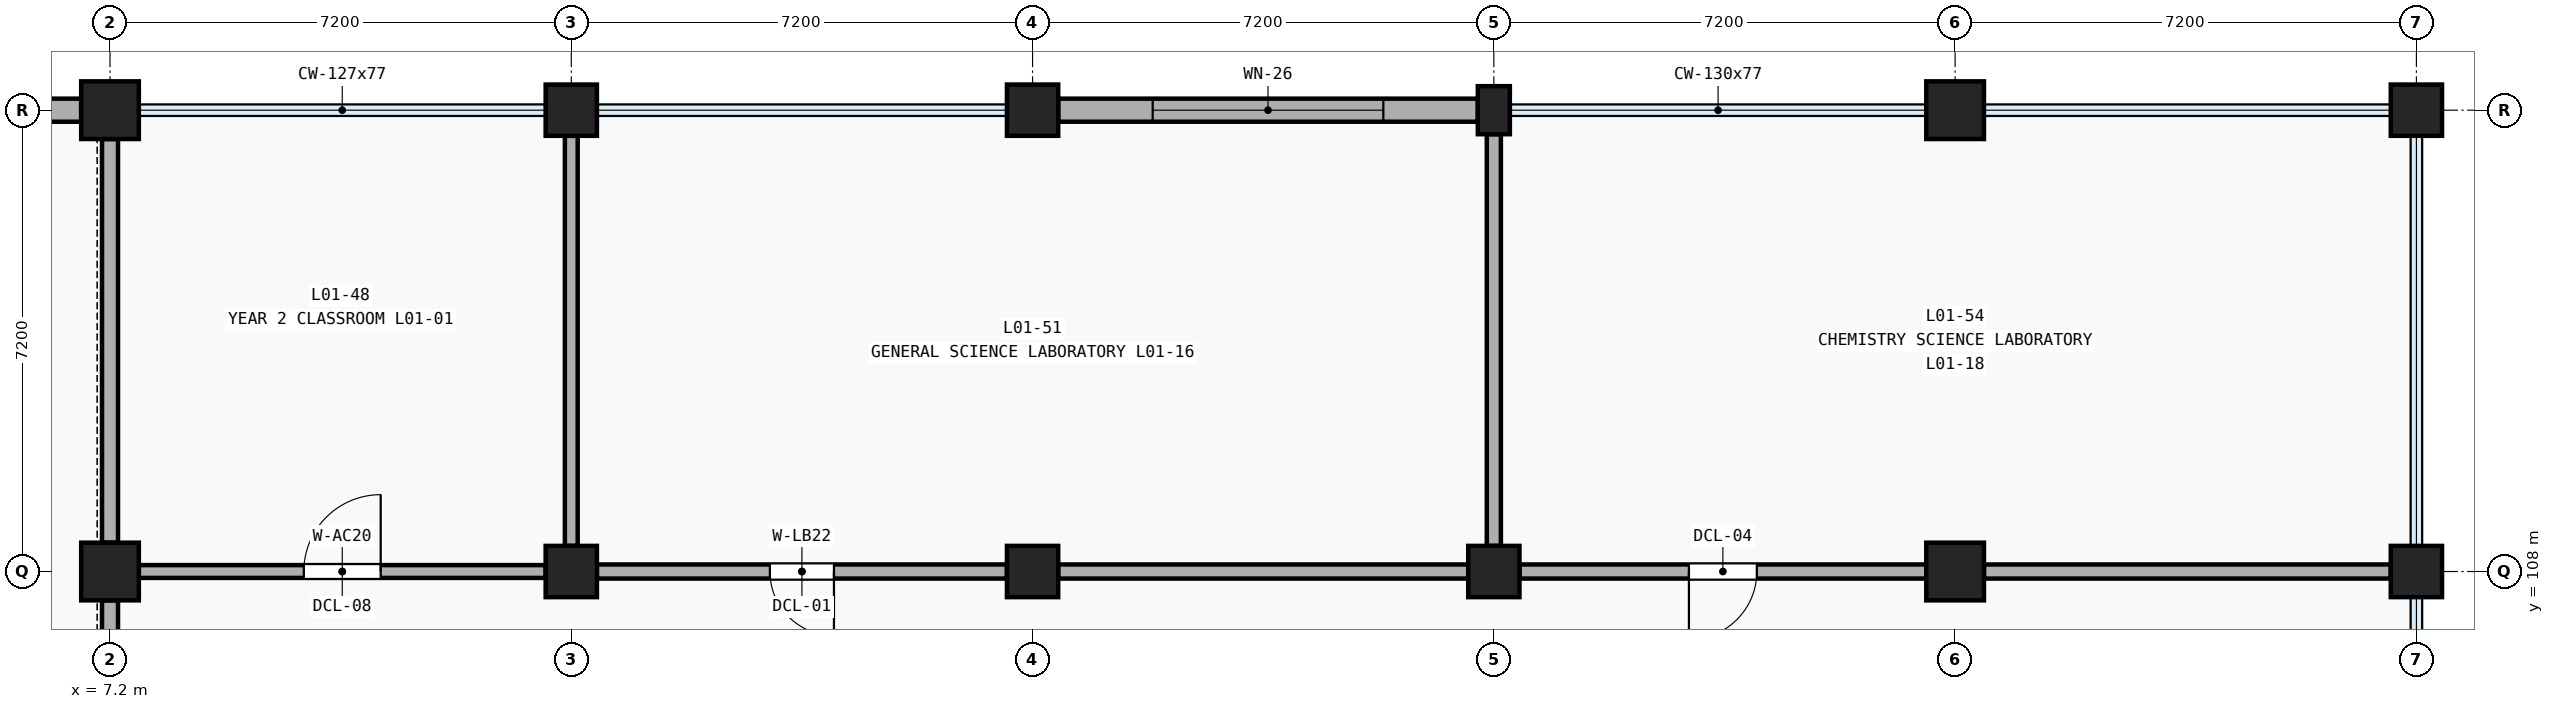
"""IFC4 building model, lengths in metres.
Left out: names, types, materials, properties, quantities, classifications, styles, units other than length and angle.
Written with IfcOpenShell. Run it as: python <this file> out.ifc"""

import sys

from ifc_helpers import new_model, si_unit, direction, frame, frame_2d, origin, origin_2d, place, context, subcontext, project, spatial, rectangle, extrude, element, fill, save


model = new_model("IFC4")
c1 = context("Model", 3, precision=1e-05, world=origin(), true_north=direction((0.0, 1.0)))
c2 = subcontext(c1, "Body", "Model", "MODEL_VIEW")
j1 = project(units=[si_unit("LENGTHUNIT", "METRE"), si_unit("PLANEANGLEUNIT", "RADIAN")], contexts=[c1])
p1 = place(None, origin())
s1 = spatial("IfcSite", under=j1, at=p1, CompositionType="ELEMENT")
p2 = place(p1, origin())
s2 = spatial("IfcBuilding", under=s1, at=p2, CompositionType="ELEMENT")
p3 = place(p2, frame((0.0, 0.0, 4.8)))
s3 = spatial("IfcBuildingStorey", under=s2, at=p3, CompositionType="ELEMENT", Elevation=4.8)
for number, where, z_axis, x_axis in (
    (1, (7.2, 108.0, 0.0), (0.0, 0.0, 1.0), (1.0, 0.0, 0.0)),
    (2, (7.2, 115.2, 0.0), (0.0, 0.0, 1.0), (1.0, 0.0, 0.0)),
):
    element("IfcColumn", number, at=place(p3, frame(where, z_axis=z_axis, x_axis=x_axis)), inside=s3, PredefinedType="COLUMN", context=c2, shape_type="SweptSolid", body=[
        extrude(rectangle(XDim=0.9, YDim=0.9, at=origin_2d()), origin(), (0.0, 0.0, 1.0), 4.8),
    ])
for number, where, z_axis, x_axis in (
    (3, (14.4, 108.0, 0.0), (0.0, 0.0, 1.0), (1.0, 0.0, 0.0)),
    (4, (14.4, 115.2, 0.0), (0.0, 0.0, 1.0), (1.0, 0.0, 0.0)),
    (5, (21.6, 108.0, 0.0), (0.0, 0.0, 1.0), (1.0, 0.0, 0.0)),
    (6, (21.6, 115.2, 0.0), (0.0, 0.0, 1.0), (1.0, 0.0, 0.0)),
    (7, (28.8, 108.0, 0.0), (0.0, 0.0, 1.0), (1.0, 0.0, 0.0)),
):
    element("IfcColumn", number, at=place(p3, frame(where, z_axis=z_axis, x_axis=x_axis)), inside=s3, PredefinedType="COLUMN", context=c2, shape_type="SweptSolid", body=[
        extrude(rectangle(XDim=0.8, YDim=0.8, at=origin_2d()), origin(), (0.0, 0.0, 1.0), 4.8),
    ])
p4 = place(p3, frame((28.8, 115.2, 0.0), z_axis=(0.0, 0.0, 1.0), x_axis=(1.0, 0.0, 0.0)))
e8 = element("IfcColumn", 8, at=p4, inside=s3, PredefinedType="PILASTER", context=c2, shape_type="SweptSolid", body=[
    extrude(rectangle(XDim=0.5, YDim=0.75, at=origin_2d()), origin(), (0.0, 0.0, 1.0), 4.8),
])
for number, where, z_axis, x_axis in (
    (9, (36.0, 108.0, 0.0), (0.0, 0.0, 1.0), (1.0, 0.0, 0.0)),
    (10, (36.0, 115.2, 0.0), (0.0, 0.0, 1.0), (1.0, 0.0, 0.0)),
):
    element("IfcColumn", number, at=place(p3, frame(where, z_axis=z_axis, x_axis=x_axis)), inside=s3, PredefinedType="COLUMN", context=c2, shape_type="SweptSolid", body=[
        extrude(rectangle(XDim=0.9, YDim=0.9, at=origin_2d()), origin(), (0.0, 0.0, 1.0), 4.8),
    ])
for number, where, z_axis, x_axis in (
    (11, (43.2, 108.0, 0.0), (0.0, 0.0, 1.0), (1.0, 0.0, 0.0)),
    (12, (43.2, 115.2, 0.0), (0.0, 0.0, 1.0), (1.0, 0.0, 0.0)),
):
    element("IfcColumn", number, at=place(p3, frame(where, z_axis=z_axis, x_axis=x_axis)), inside=s3, PredefinedType="COLUMN", context=c2, shape_type="SweptSolid", body=[
        extrude(rectangle(XDim=0.8, YDim=0.8, at=origin_2d()), origin(), (0.0, 0.0, 1.0), 4.8),
    ])
p5 = place(p3, frame((0.4, 115.2, 0.0), z_axis=(0.0, 0.0, 1.0), x_axis=(1.0, 0.0, 0.0)))
e13 = element("IfcWall", 13, at=p5, inside=s3, PredefinedType="SOLIDWALL", context=c2, shape_type="SweptSolid", body=[
    extrude(rectangle(XDim=6.35, YDim=0.36, at=frame_2d((3.175, 0.0))), origin(), (0.0, 0.0, 1.0), 3.85),
])
p6 = place(p5, frame((1.975, 0.0, 0.7)))
e14 = element("IfcOpeningElement", 14, at=p6, cuts=e13, PredefinedType="OPENING", context=c2, shape_type="SweptSolid", body=[
    extrude(rectangle(XDim=2.4, YDim=2.2, at=frame_2d((1.2, 1.1))), frame((0.0, 0.192, 0.0), z_axis=(0.0, -1.0, 0.0), x_axis=(1.0, 0.0, 0.0)), (0.0, 0.0, 1.0), 0.384),
])
p7 = place(p3, frame((22.0, 115.2, 0.0), z_axis=(0.0, 0.0, 1.0), x_axis=(1.0, 0.0, 0.0)))
e15 = element("IfcWall", 15, at=p7, inside=s3, PredefinedType="SOLIDWALL", context=c2, shape_type="SweptSolid", body=[
    extrude(rectangle(XDim=6.55, YDim=0.36, at=frame_2d((3.275, 0.0))), origin(), (0.0, 0.0, 1.0), 3.85),
])
p8 = place(p7, frame((1.475, 0.0, 0.7)))
e16 = element("IfcOpeningElement", 16, at=p8, cuts=e15, PredefinedType="OPENING", context=c2, shape_type="SweptSolid", body=[
    extrude(rectangle(XDim=3.6, YDim=2.2, at=frame_2d((1.8, 1.1))), frame((0.0, 0.192, 0.0), z_axis=(0.0, -1.0, 0.0), x_axis=(1.0, 0.0, 0.0)), (0.0, 0.0, 1.0), 0.384),
])
p9 = place(p3, frame((7.2, 101.25, 0.0), z_axis=(0.0, 0.0, 1.0), x_axis=(0.0, 1.0, 0.0)))
e17 = element("IfcWall", 17, at=p9, inside=s3, PredefinedType="PARTITIONING", context=c2, shape_type="SweptSolid", body=[
    extrude(rectangle(XDim=6.3, YDim=0.25, at=frame_2d((3.15, 0.0))), origin(), (0.0, 0.0, 1.0), 3.58),
])
p10 = place(p9, frame((2.2, 0.0, 0.0)))
e18 = element("IfcOpeningElement", 18, at=p10, cuts=e17, PredefinedType="OPENING", context=c2, shape_type="SweptSolid", body=[
    extrude(rectangle(XDim=1.9, YDim=2.35, at=frame_2d((0.95, 1.175))), frame((0.0, 0.137, 0.0), z_axis=(0.0, -1.0, 0.0), x_axis=(1.0, 0.0, 0.0)), (0.0, 0.0, 1.0), 0.274),
])
p11 = place(p3, frame((7.2, 108.45, 0.0), z_axis=(0.0, 0.0, 1.0), x_axis=(0.0, 1.0, 0.0)))
e19 = element("IfcWall", 19, at=p11, inside=s3, PredefinedType="PARTITIONING", context=c2, shape_type="SweptSolid", body=[
    extrude(rectangle(XDim=6.3, YDim=0.25, at=frame_2d((3.15, 0.0))), origin(), (0.0, 0.0, 1.0), 3.58),
])
p12 = place(p3, frame((7.65, 108.0, 0.0), z_axis=(0.0, 0.0, 1.0), x_axis=(1.0, 0.0, 0.0)))
e20 = element("IfcWall", 20, at=p12, inside=s3, PredefinedType="PARTITIONING", context=c2, shape_type="SweptSolid", body=[
    extrude(rectangle(XDim=6.35, YDim=0.2, at=frame_2d((3.175, 0.0))), origin(), (0.0, 0.0, 1.0), 3.58),
])
p13 = place(p12, frame((2.575, 0.0, 0.0)))
e21 = element("IfcOpeningElement", 21, at=p13, cuts=e20, PredefinedType="OPENING", context=c2, shape_type="SweptSolid", body=[
    extrude(rectangle(XDim=1.2, YDim=2.24, at=frame_2d((0.6, 1.12))), frame((0.0, 0.112, 0.0), z_axis=(0.0, -1.0, 0.0), x_axis=(1.0, 0.0, 0.0)), (0.0, 0.0, 1.0), 0.224),
])
p14 = place(p3, frame((14.4, 108.4, 0.0), z_axis=(0.0, 0.0, 1.0), x_axis=(0.0, 1.0, 0.0)))
e22 = element("IfcWall", 22, at=p14, inside=s3, PredefinedType="PARTITIONING", context=c2, shape_type="SweptSolid", body=[
    extrude(rectangle(XDim=6.4, YDim=0.2, at=frame_2d((3.2, 0.0))), origin(), (0.0, 0.0, 1.0), 3.58),
])
p15 = place(p3, frame((14.8, 108.0, 0.0), z_axis=(0.0, 0.0, 1.0), x_axis=(1.0, 0.0, 0.0)))
e23 = element("IfcWall", 23, at=p15, inside=s3, PredefinedType="PARTITIONING", context=c2, shape_type="SweptSolid", body=[
    extrude(rectangle(XDim=6.4, YDim=0.22, at=frame_2d((3.2, 0.0))), origin(), (0.0, 0.0, 1.0), 3.58),
])
p16 = place(p15, frame((2.7, 0.0, 0.0)))
e24 = element("IfcOpeningElement", 24, at=p16, cuts=e23, PredefinedType="OPENING", context=c2, shape_type="SweptSolid", body=[
    extrude(rectangle(XDim=1.0, YDim=2.1, at=frame_2d((0.5, 1.05))), frame((0.0, 0.122, 0.0), z_axis=(0.0, -1.0, 0.0), x_axis=(1.0, 0.0, 0.0)), (0.0, 0.0, 1.0), 0.244),
])
p17 = place(p3, frame((22.0, 108.0, 0.0), z_axis=(0.0, 0.0, 1.0), x_axis=(1.0, 0.0, 0.0)))
e25 = element("IfcWall", 25, at=p17, inside=s3, PredefinedType="PARTITIONING", context=c2, shape_type="SweptSolid", body=[
    extrude(rectangle(XDim=6.4, YDim=0.22, at=frame_2d((3.2, 0.0))), origin(), (0.0, 0.0, 1.0), 3.58),
])
p18 = place(p3, frame((28.8, 108.4, 0.0), z_axis=(0.0, 0.0, 1.0), x_axis=(0.0, 1.0, 0.0)))
e26 = element("IfcWall", 26, at=p18, inside=s3, PredefinedType="PARTITIONING", context=c2, shape_type="SweptSolid", body=[
    extrude(rectangle(XDim=6.425, YDim=0.22, at=frame_2d((3.212, 0.0))), origin(), (0.0, 0.0, 1.0), 3.58),
])
p19 = place(p3, frame((29.2, 108.0, 0.0), z_axis=(0.0, 0.0, 1.0), x_axis=(1.0, 0.0, 0.0)))
e27 = element("IfcWall", 27, at=p19, inside=s3, PredefinedType="PARTITIONING", context=c2, shape_type="SweptSolid", body=[
    extrude(rectangle(XDim=6.35, YDim=0.22, at=frame_2d((3.175, 0.0))), origin(), (0.0, 0.0, 1.0), 3.58),
])
p20 = place(p19, frame((2.645, 0.0, 0.0)))
e28 = element("IfcOpeningElement", 28, at=p20, cuts=e27, PredefinedType="OPENING", context=c2, shape_type="SweptSolid", body=[
    extrude(rectangle(XDim=1.06, YDim=2.16, at=frame_2d((0.53, 1.08))), frame((0.0, 0.122, 0.0), z_axis=(0.0, -1.0, 0.0), x_axis=(1.0, 0.0, 0.0)), (0.0, 0.0, 1.0), 0.244),
])
p21 = place(p3, frame((36.45, 108.0, 0.0), z_axis=(0.0, 0.0, 1.0), x_axis=(1.0, 0.0, 0.0)))
e29 = element("IfcWall", 29, at=p21, inside=s3, PredefinedType="PARTITIONING", context=c2, shape_type="SweptSolid", body=[
    extrude(rectangle(XDim=6.35, YDim=0.22, at=frame_2d((3.175, 0.0))), origin(), (0.0, 0.0, 1.0), 3.58),
])
p22 = place(p8, origin())
e30 = element("IfcWindow", 30, at=p22, inside=s3, PartitioningType="SINGLE_PANEL", PredefinedType="WINDOW", context=c2, shape_type="SweptSolid", body=[
    extrude(rectangle(XDim=3.6, YDim=2.2, at=frame_2d((1.8, 1.1))), frame((0.0, 0.03, 0.0), z_axis=(0.0, -1.0, 0.0), x_axis=(1.0, 0.0, 0.0)), (0.0, 0.0, 1.0), 0.06),
])
fill(e16, e30)
p23 = place(p13, origin())
e31 = element("IfcDoor", 31, at=p23, inside=s3, OperationType="SINGLE_SWING_RIGHT", PredefinedType="DOOR", context=c2, shape_type="SweptSolid", body=[
    extrude(rectangle(XDim=1.2, YDim=2.24, at=frame_2d((0.6, 1.12))), frame((0.0, 0.025, 0.0), z_axis=(0.0, -1.0, 0.0), x_axis=(1.0, 0.0, 0.0)), (0.0, 0.0, 1.0), 0.05),
])
fill(e21, e31)
p24 = place(p16, frame((1.0, 0.0, 0.0), z_axis=(0.0, 0.0, 1.0), x_axis=(-1.0, 0.0, 0.0)))
e32 = element("IfcDoor", 32, at=p24, inside=s3, OperationType="SINGLE_SWING_LEFT", PredefinedType="DOOR", context=c2, shape_type="SweptSolid", body=[
    extrude(rectangle(XDim=1.0, YDim=2.1, at=frame_2d((0.5, 1.05))), frame((0.0, 0.025, 0.0), z_axis=(0.0, -1.0, 0.0), x_axis=(1.0, 0.0, 0.0)), (0.0, 0.0, 1.0), 0.05),
])
fill(e24, e32)
p25 = place(p20, frame((1.06, 0.0, 0.0), z_axis=(0.0, 0.0, 1.0), x_axis=(-1.0, 0.0, 0.0)))
e33 = element("IfcDoor", 33, at=p25, inside=s3, OperationType="SINGLE_SWING_RIGHT", PredefinedType="DOOR", context=c2, shape_type="SweptSolid", body=[
    extrude(rectangle(XDim=1.06, YDim=2.16, at=frame_2d((0.53, 1.08))), frame((0.0, 0.025, 0.0), z_axis=(0.0, -1.0, 0.0), x_axis=(1.0, 0.0, 0.0)), (0.0, 0.0, 1.0), 0.05),
])
fill(e28, e33)
save(model, sys.argv[1])
